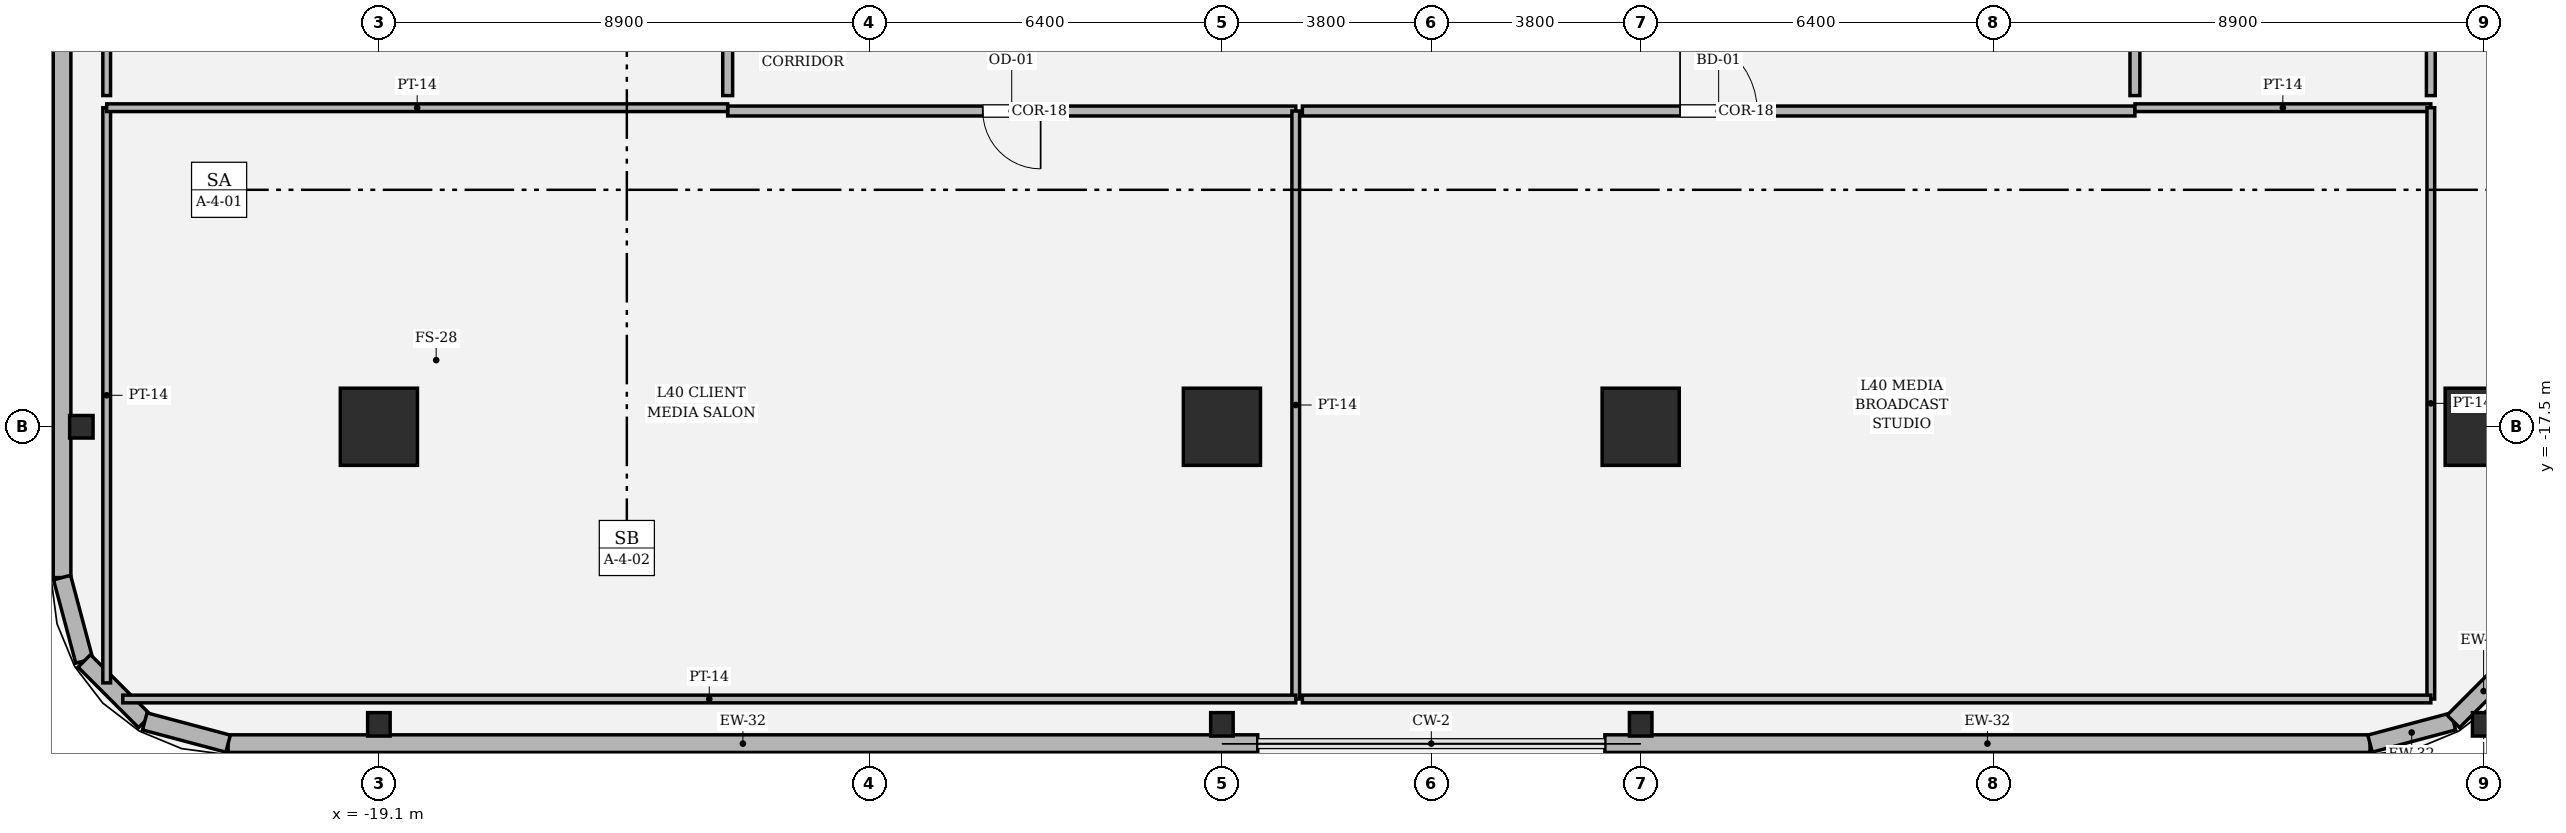
"""IFC4 building model, lengths in metres.
Left out: names, types, materials, properties, quantities, classifications, styles, units other than length and angle.
Written with IfcOpenShell. Run it as: python <this file> out.ifc"""

import sys

from ifc_helpers import new_model, si_unit, direction, frame, frame_2d, origin, origin_2d, place, context, subcontext, project, spatial, rectangle, hollow_rectangle, i_section, extrude, element, fill, save


model = new_model("IFC4")
c1 = context("Model", 3, precision=1e-05, world=origin(), true_north=direction((0.0, 1.0)))
c2 = subcontext(c1, "Body", "Model", "MODEL_VIEW")
j1 = project(units=[si_unit("LENGTHUNIT", "METRE"), si_unit("PLANEANGLEUNIT", "RADIAN")], contexts=[c1])
p1 = place(None, origin())
s1 = spatial("IfcSite", under=j1, at=p1, CompositionType="ELEMENT")
p2 = place(p1, origin())
s2 = spatial("IfcBuilding", under=s1, at=p2, CompositionType="ELEMENT")
p3 = place(p2, frame((0.0, 0.0, 172.2)))
s3 = spatial("IfcBuildingStorey", under=s2, at=p3, CompositionType="ELEMENT", Elevation=172.2)
for number, where, z_axis, x_axis in (
    (1, (-19.1, -17.5, 0.0), (0.0, 0.0, 1.0), (1.0, 0.0, 0.0)),
    (2, (-3.8, -17.5, 0.0), (0.0, 0.0, 1.0), (1.0, 0.0, 0.0)),
    (3, (3.8, -17.5, 0.0), (0.0, 0.0, 1.0), (1.0, 0.0, 0.0)),
    (4, (19.1, -17.5, 0.0), (0.0, 0.0, 1.0), (1.0, 0.0, 0.0)),
):
    element("IfcColumn", number, at=place(p3, frame(where, z_axis=z_axis, x_axis=x_axis)), inside=s3, PredefinedType="COLUMN", context=c2, shape_type="SweptSolid", body=[
        extrude(hollow_rectangle(XDim=1.4, YDim=1.4, WallThickness=0.042, at=origin_2d()), origin(), (0.0, 0.0, 1.0), 4.05),
    ])
for number, where, z_axis, x_axis in (
    (5, (-19.1, -22.9, 0.0), (0.0, 0.0, 1.0), (1.0, 0.0, 0.0)),
    (6, (-3.8, -22.9, 0.0), (0.0, 0.0, 1.0), (1.0, 0.0, 0.0)),
    (7, (3.8, -22.9, 0.0), (0.0, 0.0, 1.0), (1.0, 0.0, 0.0)),
    (8, (19.1, -22.9, 0.0), (0.0, 0.0, 1.0), (1.0, 0.0, 0.0)),
    (9, (-24.5, -17.5, 0.0), (0.0, 0.0, 1.0), (0.0, 1.0, 0.0)),
):
    element("IfcColumn", number, at=place(p3, frame(where, z_axis=z_axis, x_axis=x_axis)), inside=s3, PredefinedType="COLUMN", context=c2, shape_type="SweptSolid", body=[
        extrude(i_section(OverallWidth=0.409, OverallDepth=0.425, WebThickness=0.032, FlangeThickness=0.052, FilletRadius=0.018, at=origin_2d()), origin(), (0.0, 0.0, 1.0), 4.048),
    ])
p4 = place(p3, frame((-21.837, -23.25, 0.0), z_axis=(0.0, 0.0, 1.0), x_axis=(1.0, 0.0, 0.0)))
e10 = element("IfcWall", 10, at=p4, inside=s3, PredefinedType="SOLIDWALL", context=c2, shape_type="SweptSolid", body=[
    extrude(rectangle(XDim=18.687, YDim=0.32, at=frame_2d((9.344, 0.0))), origin(), (0.0, 0.0, 1.0), 2.544),
])
p5 = place(p3, frame((3.15, -23.25, 0.0), z_axis=(0.0, 0.0, 1.0), x_axis=(1.0, 0.0, 0.0)))
e11 = element("IfcWall", 11, at=p5, inside=s3, PredefinedType="SOLIDWALL", context=c2, shape_type="SweptSolid", body=[
    extrude(rectangle(XDim=13.887, YDim=0.32, at=frame_2d((6.943, 0.0))), origin(), (0.0, 0.0, 1.0), 2.544),
])
p6 = place(p3, frame((17.037, -23.25, 0.0), z_axis=(0.0, 0.0, 1.0), x_axis=(0.966224582397, 0.257701486942, 0.0)))
e12 = element("IfcWall", 12, at=p6, inside=s3, PredefinedType="SOLIDWALL", context=c2, shape_type="SweptSolid", body=[
    extrude(rectangle(XDim=1.565, YDim=0.32, at=frame_2d((0.783, 0.0))), origin(), (0.0, 0.0, 1.0), 2.544),
])
p7 = place(p3, frame((18.549, -22.847, 0.0), z_axis=(0.0, 0.0, 1.0), x_axis=(0.707028130747, 0.707185422879, 0.0)))
e13 = element("IfcWall", 13, at=p7, inside=s3, PredefinedType="SOLIDWALL", context=c2, shape_type="SweptSolid", body=[
    extrude(rectangle(XDim=1.552, YDim=0.32, at=frame_2d((0.776, 0.0))), origin(), (0.0, 0.0, 1.0), 2.504),
])
p8 = place(p3, frame((-24.85, -2.75, 0.0), z_axis=(0.0, 0.0, 1.0), x_axis=(0.0, -1.0, 0.0)))
e14 = element("IfcWall", 14, at=p8, inside=s3, PredefinedType="SOLIDWALL", context=c2, shape_type="SweptSolid", body=[
    extrude(rectangle(XDim=17.487, YDim=0.32, at=frame_2d((8.743, 0.0))), origin(), (0.0, 0.0, 1.0), 2.544),
])
p9 = place(p3, frame((-24.85, -20.237, 0.0), z_axis=(0.0, 0.0, 1.0), x_axis=(0.257847112249, -0.966185730957, 0.0)))
e15 = element("IfcWall", 15, at=p9, inside=s3, PredefinedType="SOLIDWALL", context=c2, shape_type="SweptSolid", body=[
    extrude(rectangle(XDim=1.565, YDim=0.32, at=frame_2d((0.783, 0.0))), origin(), (0.0, 0.0, 1.0), 3.83),
])
p10 = place(p3, frame((-24.447, -21.749, 0.0), z_axis=(0.0, 0.0, 1.0), x_axis=(0.707028130747, -0.707185422879, 0.0)))
e16 = element("IfcWall", 16, at=p10, inside=s3, PredefinedType="SOLIDWALL", context=c2, shape_type="SweptSolid", body=[
    extrude(rectangle(XDim=1.552, YDim=0.32, at=frame_2d((0.776, 0.0))), origin(), (0.0, 0.0, 1.0), 3.83),
])
p11 = place(p3, frame((-23.349, -22.847, 0.0), z_axis=(0.0, 0.0, 1.0), x_axis=(0.966224582397, -0.257701486942, 0.0)))
e17 = element("IfcWall", 17, at=p11, inside=s3, PredefinedType="SOLIDWALL", context=c2, shape_type="SweptSolid", body=[
    extrude(rectangle(XDim=1.565, YDim=0.32, at=frame_2d((0.783, 0.0))), origin(), (0.0, 0.0, 1.0), 3.83),
])
p12 = place(p3, frame((-12.77, -11.77, 0.0), z_axis=(0.0, 0.0, 1.0), x_axis=(1.0, 0.0, 0.0)))
e18 = element("IfcWall", 18, at=p12, inside=s3, PredefinedType="PARTITIONING", context=c2, shape_type="SweptSolid", body=[
    extrude(rectangle(XDim=10.31, YDim=0.18, at=frame_2d((5.155, 0.0))), origin(), (0.0, 0.0, 1.0), 3.174),
])
p13 = place(p12, frame((4.63, 0.0, 0.0)))
e19 = element("IfcOpeningElement", 19, at=p13, cuts=e18, PredefinedType="OPENING", context=c2, shape_type="SweptSolid", body=[
    extrude(rectangle(XDim=1.05, YDim=2.2, at=frame_2d((0.525, 1.1))), frame((0.0, 0.1, 0.0), z_axis=(0.0, -1.0, 0.0), x_axis=(1.0, 0.0, 0.0)), (0.0, 0.0, 1.0), 0.2),
])
p14 = place(p3, frame((-2.46, -11.77, 0.0), z_axis=(0.0, 0.0, 1.0), x_axis=(0.0, -1.0, 0.0)))
e20 = element("IfcWall", 20, at=p14, inside=s3, PredefinedType="PARTITIONING", context=c2, shape_type="SweptSolid", body=[
    extrude(rectangle(XDim=10.67, YDim=0.14, at=frame_2d((5.335, 0.0))), origin(), (0.0, 0.0, 1.0), 3.174),
])
p15 = place(p3, frame((-2.46, -22.44, 0.0), z_axis=(0.0, 0.0, 1.0), x_axis=(-1.0, 0.0, 0.0)))
e21 = element("IfcWall", 21, at=p15, inside=s3, PredefinedType="PARTITIONING", context=c2, shape_type="SweptSolid", body=[
    extrude(rectangle(XDim=21.288, YDim=0.14, at=frame_2d((10.644, 0.0))), origin(), (0.0, 0.0, 1.0), 2.504),
])
p16 = place(p3, frame((-24.04, -22.147, 0.0), z_axis=(0.0, 0.0, 1.0), x_axis=(0.0, 1.0, 0.0)))
e22 = element("IfcWall", 22, at=p16, inside=s3, PredefinedType="PARTITIONING", context=c2, shape_type="SweptSolid", body=[
    extrude(rectangle(XDim=10.438, YDim=0.14, at=frame_2d((5.219, 0.0))), origin(), (0.0, 0.0, 1.0), 2.504),
])
p17 = place(p3, frame((-24.04, -11.71, 0.0), z_axis=(0.0, 0.0, 1.0), x_axis=(1.0, 0.0, 0.0)))
e23 = element("IfcWall", 23, at=p17, inside=s3, PredefinedType="PARTITIONING", context=c2, shape_type="SweptSolid", body=[
    extrude(rectangle(XDim=11.27, YDim=0.14, at=frame_2d((5.635, 0.0))), origin(), (0.0, 0.0, 1.0), 3.174),
])
p18 = place(p3, frame((-2.34, -11.77, 0.0), z_axis=(0.0, 0.0, 1.0), x_axis=(1.0, 0.0, 0.0)))
e24 = element("IfcWall", 24, at=p18, inside=s3, PredefinedType="PARTITIONING", context=c2, shape_type="SweptSolid", body=[
    extrude(rectangle(XDim=15.11, YDim=0.18, at=frame_2d((7.555, 0.0))), origin(), (0.0, 0.0, 1.0), 3.174),
])
p19 = place(p18, frame((6.855, 0.0, 0.0)))
e25 = element("IfcOpeningElement", 25, at=p19, cuts=e24, PredefinedType="OPENING", context=c2, shape_type="SweptSolid", body=[
    extrude(rectangle(XDim=1.4, YDim=2.25, at=frame_2d((0.7, 1.125))), frame((0.0, 0.1, 0.0), z_axis=(0.0, -1.0, 0.0), x_axis=(1.0, 0.0, 0.0)), (0.0, 0.0, 1.0), 0.2),
])
p20 = place(p3, frame((12.77, -11.71, 0.0), z_axis=(0.0, 0.0, 1.0), x_axis=(1.0, 0.0, 0.0)))
e26 = element("IfcWall", 26, at=p20, inside=s3, PredefinedType="PARTITIONING", context=c2, shape_type="SweptSolid", body=[
    extrude(rectangle(XDim=5.37, YDim=0.14, at=frame_2d((2.685, 0.0))), origin(), (0.0, 0.0, 1.0), 3.424),
])
p21 = place(p3, frame((18.14, -11.71, 0.0), z_axis=(0.0, 0.0, 1.0), x_axis=(0.0, -1.0, 0.0)))
e27 = element("IfcWall", 27, at=p21, inside=s3, PredefinedType="PARTITIONING", context=c2, shape_type="SweptSolid", body=[
    extrude(rectangle(XDim=10.73, YDim=0.14, at=frame_2d((5.365, 0.0))), origin(), (0.0, 0.0, 1.0), 3.174),
])
p22 = place(p3, frame((18.14, -22.44, 0.0), z_axis=(0.0, 0.0, 1.0), x_axis=(-1.0, 0.0, 0.0)))
e28 = element("IfcWall", 28, at=p22, inside=s3, PredefinedType="PARTITIONING", context=c2, shape_type="SweptSolid", body=[
    extrude(rectangle(XDim=20.48, YDim=0.14, at=frame_2d((10.24, 0.0))), origin(), (0.0, 0.0, 1.0), 2.504),
])
p23 = place(p3, frame((-12.77, -3.014, 0.0), z_axis=(0.0, 0.0, 1.0), x_axis=(0.0, -1.0, 0.0)))
e29 = element("IfcWall", 29, at=p23, inside=s3, PredefinedType="PARTITIONING", context=c2, shape_type="SweptSolid", body=[
    extrude(rectangle(XDim=8.476, YDim=0.18, at=frame_2d((4.238, 0.0))), origin(), (0.0, 0.0, 1.0), 3.174),
])
p24 = place(p23, frame((3.713, 0.0, 0.0)))
e30 = element("IfcOpeningElement", 30, at=p24, cuts=e29, PredefinedType="OPENING", context=c2, shape_type="SweptSolid", body=[
    extrude(rectangle(XDim=1.05, YDim=2.2, at=frame_2d((0.525, 1.1))), frame((0.0, 0.1, 0.0), z_axis=(0.0, -1.0, 0.0), x_axis=(1.0, 0.0, 0.0)), (0.0, 0.0, 1.0), 0.2),
])
p25 = place(p3, frame((-24.04, -11.49, 0.0), z_axis=(0.0, 0.0, 1.0), x_axis=(0.0, 1.0, 0.0)))
e31 = element("IfcWall", 31, at=p25, inside=s3, PredefinedType="PARTITIONING", context=c2, shape_type="SweptSolid", body=[
    extrude(rectangle(XDim=8.476, YDim=0.14, at=frame_2d((4.238, 0.0))), origin(), (0.0, 0.0, 1.0), 2.504),
])
p26 = place(p3, frame((18.14, 16.54, 0.0), z_axis=(0.0, 0.0, 1.0), x_axis=(0.0, -1.0, 0.0)))
e32 = element("IfcWall", 32, at=p26, inside=s3, PredefinedType="PARTITIONING", context=c2, shape_type="SweptSolid", body=[
    extrude(rectangle(XDim=28.03, YDim=0.16, at=frame_2d((14.015, 0.0))), origin(), (0.0, 0.0, 1.0), 3.174),
])
p27 = place(p3, frame((12.77, -11.49, 0.0), z_axis=(0.0, 0.0, 1.0), x_axis=(0.0, 1.0, 0.0)))
e33 = element("IfcWall", 33, at=p27, inside=s3, PredefinedType="PARTITIONING", context=c2, shape_type="SweptSolid", body=[
    extrude(rectangle(XDim=28.03, YDim=0.18, at=frame_2d((14.015, 0.0))), origin(), (0.0, 0.0, 1.0), 3.174),
])
p28 = place(p27, frame((13.49, 0.0, 0.0)))
e34 = element("IfcOpeningElement", 34, at=p28, cuts=e33, PredefinedType="OPENING", context=c2, shape_type="SweptSolid", body=[
    extrude(rectangle(XDim=1.05, YDim=2.2, at=frame_2d((0.525, 1.1))), frame((0.0, 0.1, 0.0), z_axis=(0.0, -1.0, 0.0), x_axis=(1.0, 0.0, 0.0)), (0.0, 0.0, 1.0), 0.2),
])
p29 = place(p13, origin())
e35 = element("IfcDoor", 35, at=p29, inside=s3, OperationType="SINGLE_SWING_RIGHT", PredefinedType="DOOR", context=c2, shape_type="SweptSolid", body=[
    extrude(rectangle(XDim=1.05, YDim=2.2, at=frame_2d((0.525, 1.1))), frame((0.0, 0.025, 0.0), z_axis=(0.0, -1.0, 0.0), x_axis=(1.0, 0.0, 0.0)), (0.0, 0.0, 1.0), 0.05),
])
fill(e19, e35)
p30 = place(p19, origin())
e36 = element("IfcDoor", 36, at=p30, inside=s3, OperationType="SINGLE_SWING_LEFT", PredefinedType="DOOR", context=c2, shape_type="SweptSolid", body=[
    extrude(rectangle(XDim=1.4, YDim=2.25, at=frame_2d((0.7, 1.125))), frame((0.0, 0.025, 0.0), z_axis=(0.0, -1.0, 0.0), x_axis=(1.0, 0.0, 0.0)), (0.0, 0.0, 1.0), 0.05),
])
fill(e25, e36)
save(model, sys.argv[1])
